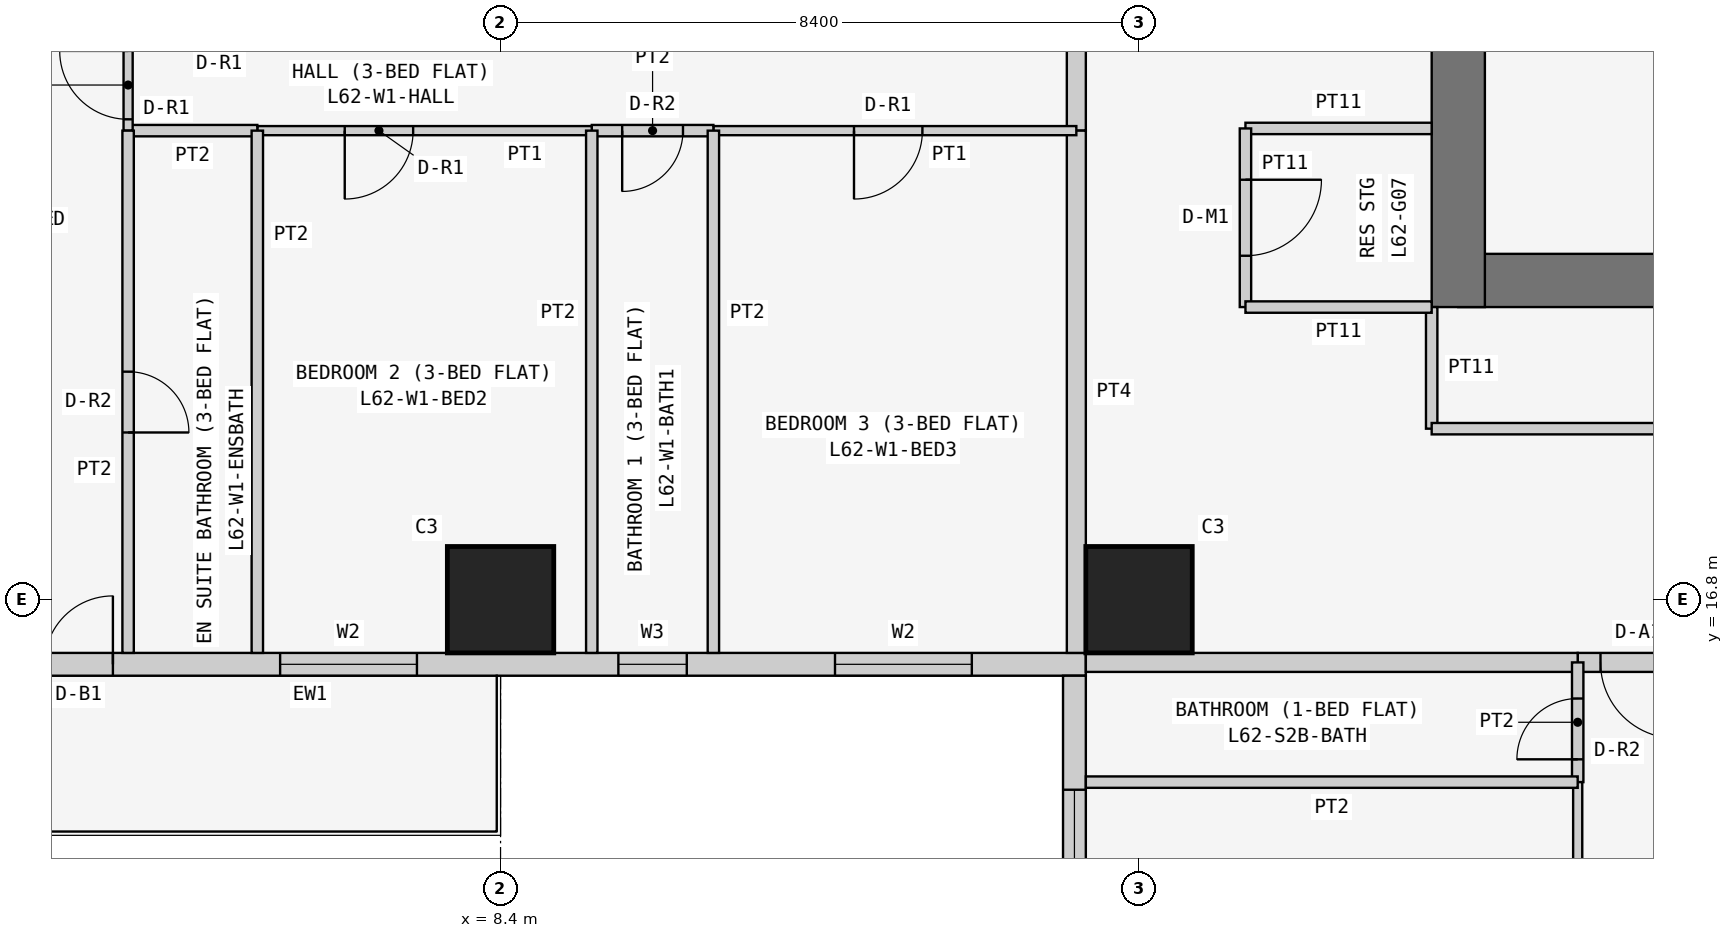
"""IFC4 building model, lengths in metres.
Left out: names, types, materials, properties, quantities, classifications, styles, units other than length and angle.
Written with IfcOpenShell. Run it as: python <this file> out.ifc"""

import sys

from ifc_helpers import new_model, si_unit, direction, frame, frame_2d, origin, origin_2d, place, context, subcontext, project, spatial, rectangle, extrude, element, fill, save


model = new_model("IFC4")
c1 = context("Model", 3, precision=1e-05, world=origin(), true_north=direction((0.0, 1.0)))
c2 = subcontext(c1, "Body", "Model", "MODEL_VIEW")
j1 = project(units=[si_unit("LENGTHUNIT", "METRE"), si_unit("PLANEANGLEUNIT", "RADIAN")], contexts=[c1])
p1 = place(None, origin())
s1 = spatial("IfcSite", under=j1, at=p1, CompositionType="ELEMENT")
p2 = place(p1, origin())
s2 = spatial("IfcBuilding", under=s1, at=p2, CompositionType="ELEMENT")
p3 = place(p2, frame((0.0, 0.0, 237.3)))
s3 = spatial("IfcBuildingStorey", under=s2, at=p3, CompositionType="ELEMENT", Elevation=237.3)
for number, where, z_axis, x_axis in (
    (1, (8.4, 16.8, 0.0), (0.0, 0.0, 1.0), (1.0, 0.0, 0.0)),
    (2, (16.8, 16.8, 0.0), (0.0, 0.0, 1.0), (1.0, 0.0, 0.0)),
):
    element("IfcColumn", number, at=place(p3, frame(where, z_axis=z_axis, x_axis=x_axis)), inside=s3, PredefinedType="COLUMN", context=c2, shape_type="SweptSolid", body=[
        extrude(rectangle(XDim=1.4, YDim=1.4, at=origin_2d()), origin(), (0.0, 0.0, 1.0), 3.6),
    ])
p4 = place(p3, frame((21.0, 21.0, 0.0), z_axis=(0.0, 0.0, 1.0), x_axis=(1.0, 0.0, 0.0)))
e3 = element("IfcWall", 3, at=p4, inside=s3, PredefinedType="SHEAR", context=c2, shape_type="SweptSolid", body=[
    extrude(rectangle(XDim=17.15, YDim=0.7, at=frame_2d((8.575, 0.0))), origin(), (0.0, 0.0, 1.0), 3.6),
])
p5 = place(p3, frame((21.0, 37.8, 0.0), z_axis=(0.0, 0.0, 1.0), x_axis=(0.0, -1.0, 0.0)))
e4 = element("IfcWall", 4, at=p5, inside=s3, PredefinedType="SHEAR", context=c2, shape_type="SweptSolid", body=[
    extrude(rectangle(XDim=17.15, YDim=0.7, at=frame_2d((8.575, 0.0))), origin(), (0.0, 0.0, 1.0), 3.6),
])
p6 = place(p5, frame((5.4, 0.0, 0.0)))
e5 = element("IfcOpeningElement", 5, at=p6, cuts=e4, PredefinedType="OPENING", context=c2, shape_type="SweptSolid", body=[
    extrude(rectangle(XDim=1.2, YDim=2.1, at=frame_2d((0.6, 1.05))), frame((0.0, 0.36, 0.0), z_axis=(0.0, -1.0, 0.0), x_axis=(1.0, 0.0, 0.0)), (0.0, 0.0, 1.0), 0.72),
])
p7 = place(p3, frame((0.4, 15.95, 0.0), z_axis=(0.0, 0.0, 1.0), x_axis=(1.0, 0.0, 0.0)))
e6 = element("IfcWall", 6, at=p7, inside=s3, PredefinedType="SOLIDWALL", context=c2, shape_type="SweptSolid", body=[
    extrude(rectangle(XDim=15.7, YDim=0.3, at=frame_2d((7.85, 0.0))), origin(), (0.0, 0.0, 1.0), 3.45),
])
p8 = place(p7, frame((12.4, 0.0, 0.9)))
e7 = element("IfcOpeningElement", 7, at=p8, cuts=e6, PredefinedType="OPENING", context=c2, shape_type="SweptSolid", body=[
    extrude(rectangle(XDim=1.8, YDim=1.5, at=frame_2d((0.9, 0.75))), frame((0.0, 0.16, 0.0), z_axis=(0.0, -1.0, 0.0), x_axis=(1.0, 0.0, 0.0)), (0.0, 0.0, 1.0), 0.32),
])
p9 = place(p7, frame((9.55, 0.0, 1.5)))
e8 = element("IfcOpeningElement", 8, at=p9, cuts=e6, PredefinedType="OPENING", context=c2, shape_type="SweptSolid", body=[
    extrude(rectangle(XDim=0.9, YDim=0.7, at=frame_2d((0.45, 0.35))), frame((0.0, 0.16, 0.0), z_axis=(0.0, -1.0, 0.0), x_axis=(1.0, 0.0, 0.0)), (0.0, 0.0, 1.0), 0.32),
])
p10 = place(p7, frame((5.1, 0.0, 0.9)))
e9 = element("IfcOpeningElement", 9, at=p10, cuts=e6, PredefinedType="OPENING", context=c2, shape_type="SweptSolid", body=[
    extrude(rectangle(XDim=1.8, YDim=1.5, at=frame_2d((0.9, 0.75))), frame((0.0, 0.16, 0.0), z_axis=(0.0, -1.0, 0.0), x_axis=(1.0, 0.0, 0.0)), (0.0, 0.0, 1.0), 0.32),
])
p11 = place(p7, frame((2.0, 0.0, 0.0)))
e10 = element("IfcOpeningElement", 10, at=p11, cuts=e6, PredefinedType="OPENING", context=c2, shape_type="SweptSolid", body=[
    extrude(rectangle(XDim=0.9, YDim=2.4, at=frame_2d((0.45, 1.2))), frame((0.0, 0.16, 0.0), z_axis=(0.0, -1.0, 0.0), x_axis=(1.0, 0.0, 0.0)), (0.0, 0.0, 1.0), 0.32),
])
p12 = place(p7, frame((0.7, 0.0, 0.9)))
e11 = element("IfcOpeningElement", 11, at=p12, cuts=e6, PredefinedType="OPENING", context=c2, shape_type="SweptSolid", body=[
    extrude(rectangle(XDim=1.2, YDim=1.5, at=frame_2d((0.6, 0.75))), frame((0.0, 0.16, 0.0), z_axis=(0.0, -1.0, 0.0), x_axis=(1.0, 0.0, 0.0)), (0.0, 0.0, 1.0), 0.32),
])
p13 = place(p3, frame((15.95, 15.8, 0.0), z_axis=(0.0, 0.0, 1.0), x_axis=(0.0, -1.0, 0.0)))
e12 = element("IfcWall", 12, at=p13, inside=s3, PredefinedType="SOLIDWALL", context=c2, shape_type="SweptSolid", body=[
    extrude(rectangle(XDim=7.0, YDim=0.3, at=frame_2d((3.5, 0.0))), origin(), (0.0, 0.0, 1.0), 3.45),
])
p14 = place(p13, frame((1.5, 0.0, 0.9)))
e13 = element("IfcOpeningElement", 13, at=p14, cuts=e12, PredefinedType="OPENING", context=c2, shape_type="SweptSolid", body=[
    extrude(rectangle(XDim=2.4, YDim=1.5, at=frame_2d((1.2, 0.75))), frame((0.0, 0.16, 0.0), z_axis=(0.0, -1.0, 0.0), x_axis=(1.0, 0.0, 0.0)), (0.0, 0.0, 1.0), 0.32),
])
p15 = place(p13, frame((5.05, 0.0, 0.9)))
e14 = element("IfcOpeningElement", 14, at=p15, cuts=e12, PredefinedType="OPENING", context=c2, shape_type="SweptSolid", body=[
    extrude(rectangle(XDim=1.2, YDim=1.5, at=frame_2d((0.6, 0.75))), frame((0.0, 0.16, 0.0), z_axis=(0.0, -1.0, 0.0), x_axis=(1.0, 0.0, 0.0)), (0.0, 0.0, 1.0), 0.32),
])
p16 = place(p3, frame((20.65, 20.65, 0.0), z_axis=(0.0, 0.0, 1.0), x_axis=(0.0, -1.0, 0.0)))
e15 = element("IfcWall", 15, at=p16, inside=s3, PredefinedType="PARTITIONING", context=c2, shape_type="SweptSolid", body=[
    extrude(rectangle(XDim=1.6, YDim=0.15, at=frame_2d((0.8, 0.0))), origin(), (0.0, 0.0, 1.0), 3.45),
])
p17 = place(p3, frame((20.65, 19.05, 0.0), z_axis=(0.0, 0.0, 1.0), x_axis=(1.0, 0.0, 0.0)))
e16 = element("IfcWall", 16, at=p17, inside=s3, PredefinedType="PARTITIONING", context=c2, shape_type="SweptSolid", body=[
    extrude(rectangle(XDim=11.95, YDim=0.15, at=frame_2d((5.975, 0.0))), origin(), (0.0, 0.0, 1.0), 3.45),
])
p18 = place(p17, frame((8.25, 0.0, 0.0)))
e17 = element("IfcOpeningElement", 17, at=p18, cuts=e16, PredefinedType="OPENING", context=c2, shape_type="SweptSolid", body=[
    extrude(rectangle(XDim=1.0, YDim=2.1, at=frame_2d((0.5, 1.05))), frame((0.0, 0.085, 0.0), z_axis=(0.0, -1.0, 0.0), x_axis=(1.0, 0.0, 0.0)), (0.0, 0.0, 1.0), 0.17),
])
p19 = place(p3, frame((20.65, 23.0, 0.0), z_axis=(0.0, 0.0, 1.0), x_axis=(-1.0, 0.0, 0.0)))
e18 = element("IfcWall", 18, at=p19, inside=s3, PredefinedType="PARTITIONING", context=c2, shape_type="SweptSolid", body=[
    extrude(rectangle(XDim=2.45, YDim=0.15, at=frame_2d((1.225, 0.0))), origin(), (0.0, 0.0, 1.0), 3.45),
])
p20 = place(p3, frame((18.2, 23.0, 0.0), z_axis=(0.0, 0.0, 1.0), x_axis=(0.0, -1.0, 0.0)))
e19 = element("IfcWall", 19, at=p20, inside=s3, PredefinedType="PARTITIONING", context=c2, shape_type="SweptSolid", body=[
    extrude(rectangle(XDim=2.35, YDim=0.15, at=frame_2d((1.175, 0.0))), origin(), (0.0, 0.0, 1.0), 3.45),
])
p21 = place(p20, frame((0.675, 0.0, 0.0)))
e20 = element("IfcOpeningElement", 20, at=p21, cuts=e19, PredefinedType="OPENING", context=c2, shape_type="SweptSolid", body=[
    extrude(rectangle(XDim=1.0, YDim=2.1, at=frame_2d((0.5, 1.05))), frame((0.0, 0.085, 0.0), z_axis=(0.0, -1.0, 0.0), x_axis=(1.0, 0.0, 0.0)), (0.0, 0.0, 1.0), 0.17),
])
p22 = place(p3, frame((18.2, 20.65, 0.0), z_axis=(0.0, 0.0, 1.0), x_axis=(1.0, 0.0, 0.0)))
e21 = element("IfcWall", 21, at=p22, inside=s3, PredefinedType="PARTITIONING", context=c2, shape_type="SweptSolid", body=[
    extrude(rectangle(XDim=2.45, YDim=0.15, at=frame_2d((1.225, 0.0))), origin(), (0.0, 0.0, 1.0), 3.45),
])
p23 = place(p3, frame((24.171, 15.975, 0.0), z_axis=(0.0, 0.0, 1.0), x_axis=(-1.0, 0.0, 0.0)))
e22 = element("IfcWall", 22, at=p23, inside=s3, PredefinedType="PARTITIONING", context=c2, shape_type="SweptSolid", body=[
    extrude(rectangle(XDim=1.6, YDim=0.25, at=frame_2d((0.8, 0.0))), origin(), (0.0, 0.0, 1.0), 3.45),
])
p24 = place(p23, frame((0.3, 0.0, 0.0)))
e23 = element("IfcOpeningElement", 23, at=p24, cuts=e22, PredefinedType="OPENING", context=c2, shape_type="SweptSolid", body=[
    extrude(rectangle(XDim=1.0, YDim=2.1, at=frame_2d((0.5, 1.05))), frame((0.0, 0.135, 0.0), z_axis=(0.0, -1.0, 0.0), x_axis=(1.0, 0.0, 0.0)), (0.0, 0.0, 1.0), 0.27),
])
p25 = place(p3, frame((22.571, 15.975, 0.0), z_axis=(0.0, 0.0, 1.0), x_axis=(-1.0, 0.0, 0.0)))
e24 = element("IfcWall", 24, at=p25, inside=s3, PredefinedType="PARTITIONING", context=c2, shape_type="SweptSolid", body=[
    extrude(rectangle(XDim=6.471, YDim=0.25, at=frame_2d((3.235, 0.0))), origin(), (0.0, 0.0, 1.0), 3.45),
])
p26 = place(p3, frame((15.975, 22.971, 0.0), z_axis=(0.0, 0.0, 1.0), x_axis=(0.0, 1.0, 0.0)))
e25 = element("IfcWall", 25, at=p26, inside=s3, PredefinedType="PARTITIONING", context=c2, shape_type="SweptSolid", body=[
    extrude(rectangle(XDim=1.2, YDim=0.25, at=frame_2d((0.6, 0.0))), origin(), (0.0, 0.0, 1.0), 3.45),
])
p27 = place(p3, frame((15.975, 16.1, 0.0), z_axis=(0.0, 0.0, 1.0), x_axis=(0.0, 1.0, 0.0)))
e26 = element("IfcWall", 26, at=p27, inside=s3, PredefinedType="PARTITIONING", context=c2, shape_type="SweptSolid", body=[
    extrude(rectangle(XDim=6.871, YDim=0.25, at=frame_2d((3.436, 0.0))), origin(), (0.0, 0.0, 1.0), 3.45),
])
p28 = place(p3, frame((22.571, 14.4, 0.0), z_axis=(0.0, 0.0, 1.0), x_axis=(0.0, 1.0, 0.0)))
e27 = element("IfcWall", 27, at=p28, inside=s3, PredefinedType="PARTITIONING", context=c2, shape_type="SweptSolid", body=[
    extrude(rectangle(XDim=1.575, YDim=0.15, at=frame_2d((0.788, 0.0))), origin(), (0.0, 0.0, 1.0), 3.45),
])
p29 = place(p28, frame((0.3, 0.0, 0.0)))
e28 = element("IfcOpeningElement", 28, at=p29, cuts=e27, PredefinedType="OPENING", context=c2, shape_type="SweptSolid", body=[
    extrude(rectangle(XDim=0.8, YDim=2.1, at=frame_2d((0.4, 1.05))), frame((0.0, 0.085, 0.0), z_axis=(0.0, -1.0, 0.0), x_axis=(1.0, 0.0, 0.0)), (0.0, 0.0, 1.0), 0.17),
])
p30 = place(p3, frame((22.571, 11.0, 0.0), z_axis=(0.0, 0.0, 1.0), x_axis=(0.0, 1.0, 0.0)))
e29 = element("IfcWall", 29, at=p30, inside=s3, PredefinedType="PARTITIONING", context=c2, shape_type="SweptSolid", body=[
    extrude(rectangle(XDim=3.4, YDim=0.12, at=frame_2d((1.7, 0.0))), origin(), (0.0, 0.0, 1.0), 3.45),
])
p31 = place(p30, frame((1.25, 0.0, 0.0)))
e30 = element("IfcOpeningElement", 30, at=p31, cuts=e29, PredefinedType="OPENING", context=c2, shape_type="SweptSolid", body=[
    extrude(rectangle(XDim=0.9, YDim=2.1, at=frame_2d((0.45, 1.05))), frame((0.0, 0.07, 0.0), z_axis=(0.0, -1.0, 0.0), x_axis=(1.0, 0.0, 0.0)), (0.0, 0.0, 1.0), 0.14),
])
p32 = place(p3, frame((22.571, 14.4, 0.0), z_axis=(0.0, 0.0, 1.0), x_axis=(-1.0, 0.0, 0.0)))
e31 = element("IfcWall", 31, at=p32, inside=s3, PredefinedType="PARTITIONING", context=c2, shape_type="SweptSolid", body=[
    extrude(rectangle(XDim=6.471, YDim=0.15, at=frame_2d((3.235, 0.0))), origin(), (0.0, 0.0, 1.0), 3.45),
])
p33 = place(p3, frame((11.2, 22.971, 0.0), z_axis=(0.0, 0.0, 1.0), x_axis=(1.0, 0.0, 0.0)))
e32 = element("IfcWall", 32, at=p33, inside=s3, PredefinedType="PARTITIONING", context=c2, shape_type="SweptSolid", body=[
    extrude(rectangle(XDim=4.775, YDim=0.12, at=frame_2d((2.388, 0.0))), origin(), (0.0, 0.0, 1.0), 3.45),
])
p34 = place(p33, frame((1.85, 0.0, 0.0)))
e33 = element("IfcOpeningElement", 33, at=p34, cuts=e32, PredefinedType="OPENING", context=c2, shape_type="SweptSolid", body=[
    extrude(rectangle(XDim=0.9, YDim=2.1, at=frame_2d((0.45, 1.05))), frame((0.0, 0.07, 0.0), z_axis=(0.0, -1.0, 0.0), x_axis=(1.0, 0.0, 0.0)), (0.0, 0.0, 1.0), 0.14),
])
p35 = place(p3, frame((9.6, 22.971, 0.0), z_axis=(0.0, 0.0, 1.0), x_axis=(1.0, 0.0, 0.0)))
e34 = element("IfcWall", 34, at=p35, inside=s3, PredefinedType="PARTITIONING", context=c2, shape_type="SweptSolid", body=[
    extrude(rectangle(XDim=1.6, YDim=0.15, at=frame_2d((0.8, 0.0))), origin(), (0.0, 0.0, 1.0), 3.45),
])
p36 = place(p35, frame((0.4, 0.0, 0.0)))
e35 = element("IfcOpeningElement", 35, at=p36, cuts=e34, PredefinedType="OPENING", context=c2, shape_type="SweptSolid", body=[
    extrude(rectangle(XDim=0.8, YDim=2.1, at=frame_2d((0.4, 1.05))), frame((0.0, 0.085, 0.0), z_axis=(0.0, -1.0, 0.0), x_axis=(1.0, 0.0, 0.0)), (0.0, 0.0, 1.0), 0.17),
])
p37 = place(p3, frame((5.2, 22.971, 0.0), z_axis=(0.0, 0.0, 1.0), x_axis=(1.0, 0.0, 0.0)))
e36 = element("IfcWall", 36, at=p37, inside=s3, PredefinedType="PARTITIONING", context=c2, shape_type="SweptSolid", body=[
    extrude(rectangle(XDim=4.4, YDim=0.12, at=frame_2d((2.2, 0.0))), origin(), (0.0, 0.0, 1.0), 3.45),
])
p38 = place(p37, frame((1.15, 0.0, 0.0)))
e37 = element("IfcOpeningElement", 37, at=p38, cuts=e36, PredefinedType="OPENING", context=c2, shape_type="SweptSolid", body=[
    extrude(rectangle(XDim=0.9, YDim=2.1, at=frame_2d((0.45, 1.05))), frame((0.0, 0.07, 0.0), z_axis=(0.0, -1.0, 0.0), x_axis=(1.0, 0.0, 0.0)), (0.0, 0.0, 1.0), 0.14),
])
p39 = place(p3, frame((3.5, 22.971, 0.0), z_axis=(0.0, 0.0, 1.0), x_axis=(1.0, 0.0, 0.0)))
e38 = element("IfcWall", 38, at=p39, inside=s3, PredefinedType="PARTITIONING", context=c2, shape_type="SweptSolid", body=[
    extrude(rectangle(XDim=1.7, YDim=0.15, at=frame_2d((0.85, 0.0))), origin(), (0.0, 0.0, 1.0), 3.45),
])
p40 = place(p3, frame((3.5, 24.171, 0.0), z_axis=(0.0, 0.0, 1.0), x_axis=(0.0, -1.0, 0.0)))
e39 = element("IfcWall", 39, at=p40, inside=s3, PredefinedType="PARTITIONING", context=c2, shape_type="SweptSolid", body=[
    extrude(rectangle(XDim=1.2, YDim=0.12, at=frame_2d((0.6, 0.0))), origin(), (0.0, 0.0, 1.0), 3.45),
])
p41 = place(p40, frame((0.151, 0.0, 0.0)))
e40 = element("IfcOpeningElement", 40, at=p41, cuts=e39, PredefinedType="OPENING", context=c2, shape_type="SweptSolid", body=[
    extrude(rectangle(XDim=0.9, YDim=2.1, at=frame_2d((0.45, 1.05))), frame((0.0, 0.07, 0.0), z_axis=(0.0, -1.0, 0.0), x_axis=(1.0, 0.0, 0.0)), (0.0, 0.0, 1.0), 0.14),
])
for number, where, z_axis, x_axis in (
    (41, (11.2, 22.971, 0.0), (0.0, 0.0, 1.0), (0.0, -1.0, 0.0)),
    (42, (9.6, 22.971, 0.0), (0.0, 0.0, 1.0), (0.0, -1.0, 0.0)),
    (43, (5.2, 22.971, 0.0), (0.0, 0.0, 1.0), (0.0, -1.0, 0.0)),
):
    element("IfcWall", number, at=place(p3, frame(where, z_axis=z_axis, x_axis=x_axis)), inside=s3, PredefinedType="PARTITIONING", context=c2, shape_type="SweptSolid", body=[
        extrude(rectangle(XDim=6.871, YDim=0.15, at=frame_2d((3.436, 0.0))), origin(), (0.0, 0.0, 1.0), 3.45),
    ])
p42 = place(p3, frame((3.5, 22.971, 0.0), z_axis=(0.0, 0.0, 1.0), x_axis=(0.0, -1.0, 0.0)))
e44 = element("IfcWall", 44, at=p42, inside=s3, PredefinedType="PARTITIONING", context=c2, shape_type="SweptSolid", body=[
    extrude(rectangle(XDim=6.871, YDim=0.15, at=frame_2d((3.436, 0.0))), origin(), (0.0, 0.0, 1.0), 3.45),
])
p43 = place(p42, frame((3.171, 0.0, 0.0)))
e45 = element("IfcOpeningElement", 45, at=p43, cuts=e44, PredefinedType="OPENING", context=c2, shape_type="SweptSolid", body=[
    extrude(rectangle(XDim=0.8, YDim=2.1, at=frame_2d((0.4, 1.05))), frame((0.0, 0.085, 0.0), z_axis=(0.0, -1.0, 0.0), x_axis=(1.0, 0.0, 0.0)), (0.0, 0.0, 1.0), 0.17),
])
p44 = place(p14, origin())
e46 = element("IfcWindow", 46, at=p44, inside=s3, PartitioningType="SINGLE_PANEL", PredefinedType="WINDOW", context=c2, shape_type="SweptSolid", body=[
    extrude(rectangle(XDim=2.4, YDim=1.5, at=frame_2d((1.2, 0.75))), frame((0.0, 0.03, 0.0), z_axis=(0.0, -1.0, 0.0), x_axis=(1.0, 0.0, 0.0)), (0.0, 0.0, 1.0), 0.06),
])
fill(e13, e46)
p45 = place(p8, origin())
e47 = element("IfcWindow", 47, at=p45, inside=s3, PartitioningType="SINGLE_PANEL", PredefinedType="WINDOW", context=c2, shape_type="SweptSolid", body=[
    extrude(rectangle(XDim=1.8, YDim=1.5, at=frame_2d((0.9, 0.75))), frame((0.0, 0.03, 0.0), z_axis=(0.0, -1.0, 0.0), x_axis=(1.0, 0.0, 0.0)), (0.0, 0.0, 1.0), 0.06),
])
fill(e7, e47)
p46 = place(p9, origin())
e48 = element("IfcWindow", 48, at=p46, inside=s3, PartitioningType="SINGLE_PANEL", PredefinedType="WINDOW", context=c2, shape_type="SweptSolid", body=[
    extrude(rectangle(XDim=0.9, YDim=0.7, at=frame_2d((0.45, 0.35))), frame((0.0, 0.03, 0.0), z_axis=(0.0, -1.0, 0.0), x_axis=(1.0, 0.0, 0.0)), (0.0, 0.0, 1.0), 0.06),
])
fill(e8, e48)
p47 = place(p10, origin())
e49 = element("IfcWindow", 49, at=p47, inside=s3, PartitioningType="SINGLE_PANEL", PredefinedType="WINDOW", context=c2, shape_type="SweptSolid", body=[
    extrude(rectangle(XDim=1.8, YDim=1.5, at=frame_2d((0.9, 0.75))), frame((0.0, 0.03, 0.0), z_axis=(0.0, -1.0, 0.0), x_axis=(1.0, 0.0, 0.0)), (0.0, 0.0, 1.0), 0.06),
])
fill(e9, e49)
p48 = place(p11, origin())
e50 = element("IfcDoor", 50, at=p48, inside=s3, OperationType="SINGLE_SWING_RIGHT", PredefinedType="DOOR", context=c2, shape_type="SweptSolid", body=[
    extrude(rectangle(XDim=0.9, YDim=2.4, at=frame_2d((0.45, 1.2))), frame((0.0, 0.025, 0.0), z_axis=(0.0, -1.0, 0.0), x_axis=(1.0, 0.0, 0.0)), (0.0, 0.0, 1.0), 0.05),
])
fill(e10, e50)
p49 = place(p21, origin())
e51 = element("IfcDoor", 51, at=p49, inside=s3, OperationType="SINGLE_SWING_LEFT", PredefinedType="DOOR", context=c2, shape_type="SweptSolid", body=[
    extrude(rectangle(XDim=1.0, YDim=2.1, at=frame_2d((0.5, 1.05))), frame((0.0, 0.025, 0.0), z_axis=(0.0, -1.0, 0.0), x_axis=(1.0, 0.0, 0.0)), (0.0, 0.0, 1.0), 0.05),
])
fill(e20, e51)
p50 = place(p24, origin())
e52 = element("IfcDoor", 52, at=p50, inside=s3, OperationType="SINGLE_SWING_LEFT", PredefinedType="DOOR", context=c2, shape_type="SweptSolid", body=[
    extrude(rectangle(XDim=1.0, YDim=2.1, at=frame_2d((0.5, 1.05))), frame((0.0, 0.025, 0.0), z_axis=(0.0, -1.0, 0.0), x_axis=(1.0, 0.0, 0.0)), (0.0, 0.0, 1.0), 0.05),
])
fill(e23, e52)
p51 = place(p29, origin())
e53 = element("IfcDoor", 53, at=p51, inside=s3, OperationType="SINGLE_SWING_LEFT", PredefinedType="DOOR", context=c2, shape_type="SweptSolid", body=[
    extrude(rectangle(XDim=0.8, YDim=2.1, at=frame_2d((0.4, 1.05))), frame((0.0, 0.025, 0.0), z_axis=(0.0, -1.0, 0.0), x_axis=(1.0, 0.0, 0.0)), (0.0, 0.0, 1.0), 0.05),
])
fill(e28, e53)
p52 = place(p34, frame((0.9, 0.0, 0.0), z_axis=(0.0, 0.0, 1.0), x_axis=(-1.0, 0.0, 0.0)))
e54 = element("IfcDoor", 54, at=p52, inside=s3, OperationType="SINGLE_SWING_RIGHT", PredefinedType="DOOR", context=c2, shape_type="SweptSolid", body=[
    extrude(rectangle(XDim=0.9, YDim=2.1, at=frame_2d((0.45, 1.05))), frame((0.0, 0.025, 0.0), z_axis=(0.0, -1.0, 0.0), x_axis=(1.0, 0.0, 0.0)), (0.0, 0.0, 1.0), 0.05),
])
fill(e33, e54)
p53 = place(p36, frame((0.8, 0.0, 0.0), z_axis=(0.0, 0.0, 1.0), x_axis=(-1.0, 0.0, 0.0)))
e55 = element("IfcDoor", 55, at=p53, inside=s3, OperationType="SINGLE_SWING_RIGHT", PredefinedType="DOOR", context=c2, shape_type="SweptSolid", body=[
    extrude(rectangle(XDim=0.8, YDim=2.1, at=frame_2d((0.4, 1.05))), frame((0.0, 0.025, 0.0), z_axis=(0.0, -1.0, 0.0), x_axis=(1.0, 0.0, 0.0)), (0.0, 0.0, 1.0), 0.05),
])
fill(e35, e55)
p54 = place(p38, frame((0.9, 0.0, 0.0), z_axis=(0.0, 0.0, 1.0), x_axis=(-1.0, 0.0, 0.0)))
e56 = element("IfcDoor", 56, at=p54, inside=s3, OperationType="SINGLE_SWING_RIGHT", PredefinedType="DOOR", context=c2, shape_type="SweptSolid", body=[
    extrude(rectangle(XDim=0.9, YDim=2.1, at=frame_2d((0.45, 1.05))), frame((0.0, 0.025, 0.0), z_axis=(0.0, -1.0, 0.0), x_axis=(1.0, 0.0, 0.0)), (0.0, 0.0, 1.0), 0.05),
])
fill(e37, e56)
p55 = place(p41, frame((0.9, 0.0, 0.0), z_axis=(0.0, 0.0, 1.0), x_axis=(-1.0, 0.0, 0.0)))
e57 = element("IfcDoor", 57, at=p55, inside=s3, OperationType="SINGLE_SWING_RIGHT", PredefinedType="DOOR", context=c2, shape_type="SweptSolid", body=[
    extrude(rectangle(XDim=0.9, YDim=2.1, at=frame_2d((0.45, 1.05))), frame((0.0, 0.025, 0.0), z_axis=(0.0, -1.0, 0.0), x_axis=(1.0, 0.0, 0.0)), (0.0, 0.0, 1.0), 0.05),
])
fill(e40, e57)
p56 = place(p43, origin())
e58 = element("IfcDoor", 58, at=p56, inside=s3, OperationType="SINGLE_SWING_RIGHT", PredefinedType="DOOR", context=c2, shape_type="SweptSolid", body=[
    extrude(rectangle(XDim=0.8, YDim=2.1, at=frame_2d((0.4, 1.05))), frame((0.0, 0.025, 0.0), z_axis=(0.0, -1.0, 0.0), x_axis=(1.0, 0.0, 0.0)), (0.0, 0.0, 1.0), 0.05),
])
fill(e45, e58)
save(model, sys.argv[1])
